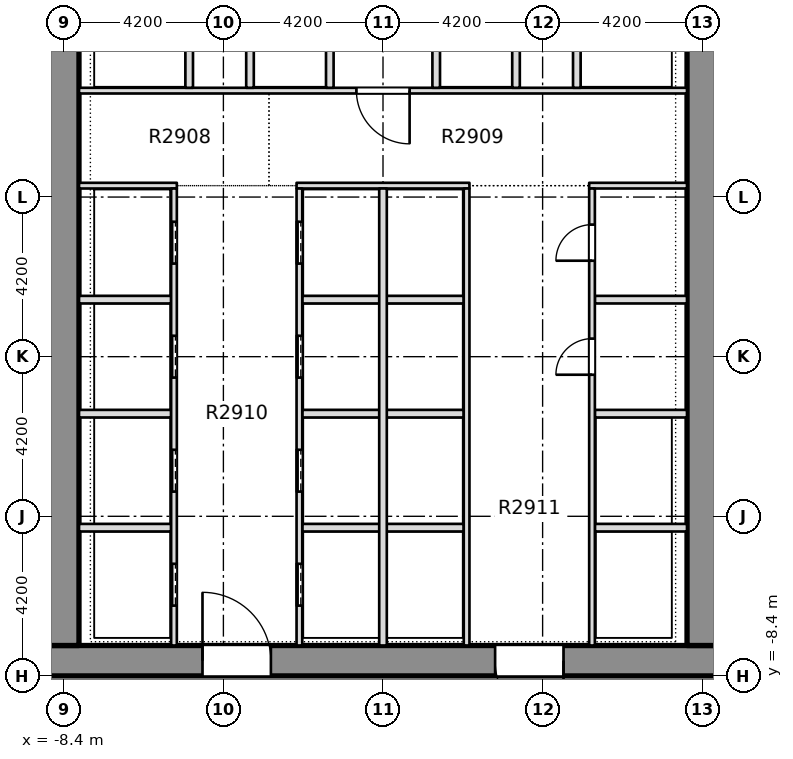
"""IFC4 building model, lengths in metres.
Left out: names, types, materials, properties, quantities, classifications, styles, units other than length and angle.
Written with IfcOpenShell. Run it as: python <this file> out.ifc"""

import sys

from ifc_helpers import new_model, si_unit, direction, frame, frame_2d, origin, place, context, subcontext, project, spatial, rectangle, extrude, element, fill, save


model = new_model("IFC4")
c1 = context("Model", 3, precision=1e-05, world=origin(), true_north=direction((0.0, 1.0)))
c2 = subcontext(c1, "Body", "Model", "MODEL_VIEW")
j1 = project(units=[si_unit("LENGTHUNIT", "METRE"), si_unit("PLANEANGLEUNIT", "RADIAN")], contexts=[c1])
p1 = place(None, origin())
s1 = spatial("IfcSite", under=j1, at=p1, CompositionType="ELEMENT")
p2 = place(p1, origin())
s2 = spatial("IfcBuilding", under=s1, at=p2, CompositionType="ELEMENT")
p3 = place(p2, frame((0.0, 0.0, 114.9)))
s3 = spatial("IfcBuildingStorey", under=s2, at=p3, CompositionType="ELEMENT", Elevation=114.9)
p4 = place(p3, frame((-11.8, -8.0, -0.32), z_axis=(0.0, 0.0, 1.0), x_axis=(1.0, 0.0, 0.0)))
e1 = element("IfcWall", 1, at=p4, inside=s3, PredefinedType="SHEAR", context=c2, shape_type="SweptSolid", body=[
    extrude(rectangle(XDim=23.6, YDim=0.8, at=frame_2d((11.8, 0.0))), origin(), (0.0, 0.0, 1.0), 3.45),
])
p5 = place(p4, frame((7.05, 0.0, 0.32)))
e2 = element("IfcOpeningElement", 2, at=p5, cuts=e1, PredefinedType="OPENING", context=c2, shape_type="SweptSolid", body=[
    extrude(rectangle(XDim=1.8, YDim=2.1, at=frame_2d((0.9, 1.05))), frame((0.0, 0.41, 0.0), z_axis=(0.0, -1.0, 0.0), x_axis=(1.0, 0.0, 0.0)), (0.0, 0.0, 1.0), 0.82),
])
p6 = place(p4, frame((14.75, 0.0, 0.32)))
e3 = element("IfcOpeningElement", 3, at=p6, cuts=e1, PredefinedType="OPENING", context=c2, shape_type="SweptSolid", body=[
    extrude(rectangle(XDim=1.8, YDim=2.1, at=frame_2d((0.9, 1.05))), frame((0.0, 0.41, 0.0), z_axis=(0.0, -1.0, 0.0), x_axis=(1.0, 0.0, 0.0)), (0.0, 0.0, 1.0), 0.82),
])
p7 = place(p3, frame((-8.4, -7.6, -0.32), z_axis=(0.0, 0.0, 1.0), x_axis=(0.0, 1.0, 0.0)))
e4 = element("IfcWall", 4, at=p7, inside=s3, PredefinedType="SHEAR", context=c2, shape_type="SweptSolid", body=[
    extrude(rectangle(XDim=28.55, YDim=0.8, at=frame_2d((14.275, 0.0))), origin(), (0.0, 0.0, 1.0), 3.45),
])
p8 = place(p7, frame((18.5, 0.0, 0.32)))
e5 = element("IfcOpeningElement", 5, at=p8, cuts=e4, PredefinedType="OPENING", context=c2, shape_type="SweptSolid", body=[
    extrude(rectangle(XDim=1.2, YDim=2.1, at=frame_2d((0.6, 1.05))), frame((0.0, 0.41, 0.0), z_axis=(0.0, -1.0, 0.0), x_axis=(1.0, 0.0, 0.0)), (0.0, 0.0, 1.0), 0.82),
])
p9 = place(p3, frame((8.4, -7.6, -0.32), z_axis=(0.0, 0.0, 1.0), x_axis=(0.0, 1.0, 0.0)))
e6 = element("IfcWall", 6, at=p9, inside=s3, PredefinedType="SHEAR", context=c2, shape_type="SweptSolid", body=[
    extrude(rectangle(XDim=28.55, YDim=0.8, at=frame_2d((14.275, 0.0))), origin(), (0.0, 0.0, 1.0), 3.45),
])
p10 = place(p9, frame((18.5, 0.0, 0.32)))
e7 = element("IfcOpeningElement", 7, at=p10, cuts=e6, PredefinedType="OPENING", context=c2, shape_type="SweptSolid", body=[
    extrude(rectangle(XDim=1.2, YDim=2.1, at=frame_2d((0.6, 1.05))), frame((0.0, 0.41, 0.0), z_axis=(0.0, -1.0, 0.0), x_axis=(1.0, 0.0, 0.0)), (0.0, 0.0, 1.0), 0.82),
])
p11 = place(p3, frame((-7.999, -4.5, 0.0), z_axis=(0.0, 0.0, 1.0), x_axis=(1.0, 0.0, 0.0)))
e8 = element("IfcWall", 8, at=p11, inside=s3, PredefinedType="PARTITIONING", context=c2, shape_type="SweptSolid", body=[
    extrude(rectangle(XDim=2.424, YDim=0.2, at=frame_2d((1.212, 0.0))), origin(), (0.0, 0.0, 1.0), 3.13),
])
p12 = place(p3, frame((-2.125, -4.5, 0.0), z_axis=(0.0, 0.0, 1.0), x_axis=(1.0, 0.0, 0.0)))
e9 = element("IfcWall", 9, at=p12, inside=s3, PredefinedType="PARTITIONING", context=c2, shape_type="SweptSolid", body=[
    extrude(rectangle(XDim=4.25, YDim=0.2, at=frame_2d((2.125, 0.0))), origin(), (0.0, 0.0, 1.0), 3.13),
])
for number, where, z_axis, x_axis in (
    (10, (5.575, -4.5, 0.0), (0.0, 0.0, 1.0), (1.0, 0.0, 0.0)),
    (11, (-7.999, -1.5, 0.0), (0.0, 0.0, 1.0), (1.0, 0.0, 0.0)),
):
    element("IfcWall", number, at=place(p3, frame(where, z_axis=z_axis, x_axis=x_axis)), inside=s3, PredefinedType="PARTITIONING", context=c2, shape_type="SweptSolid", body=[
        extrude(rectangle(XDim=2.424, YDim=0.2, at=frame_2d((1.212, 0.0))), origin(), (0.0, 0.0, 1.0), 3.13),
    ])
p13 = place(p3, frame((-2.125, -1.5, 0.0), z_axis=(0.0, 0.0, 1.0), x_axis=(1.0, 0.0, 0.0)))
e12 = element("IfcWall", 12, at=p13, inside=s3, PredefinedType="PARTITIONING", context=c2, shape_type="SweptSolid", body=[
    extrude(rectangle(XDim=4.25, YDim=0.2, at=frame_2d((2.125, 0.0))), origin(), (0.0, 0.0, 1.0), 3.13),
])
for number, where, z_axis, x_axis in (
    (13, (5.575, -1.5, 0.0), (0.0, 0.0, 1.0), (1.0, 0.0, 0.0)),
    (14, (-7.999, 1.5, 0.0), (0.0, 0.0, 1.0), (1.0, 0.0, 0.0)),
):
    element("IfcWall", number, at=place(p3, frame(where, z_axis=z_axis, x_axis=x_axis)), inside=s3, PredefinedType="PARTITIONING", context=c2, shape_type="SweptSolid", body=[
        extrude(rectangle(XDim=2.424, YDim=0.2, at=frame_2d((1.212, 0.0))), origin(), (0.0, 0.0, 1.0), 3.13),
    ])
p14 = place(p3, frame((-2.125, 1.5, 0.0), z_axis=(0.0, 0.0, 1.0), x_axis=(1.0, 0.0, 0.0)))
e15 = element("IfcWall", 15, at=p14, inside=s3, PredefinedType="PARTITIONING", context=c2, shape_type="SweptSolid", body=[
    extrude(rectangle(XDim=4.25, YDim=0.2, at=frame_2d((2.125, 0.0))), origin(), (0.0, 0.0, 1.0), 3.13),
])
p15 = place(p3, frame((5.575, 1.5, 0.0), z_axis=(0.0, 0.0, 1.0), x_axis=(1.0, 0.0, 0.0)))
e16 = element("IfcWall", 16, at=p15, inside=s3, PredefinedType="PARTITIONING", context=c2, shape_type="SweptSolid", body=[
    extrude(rectangle(XDim=2.424, YDim=0.2, at=frame_2d((1.212, 0.0))), origin(), (0.0, 0.0, 1.0), 3.13),
])
p16 = place(p3, frame((-7.999, 4.5, 0.0), z_axis=(0.0, 0.0, 1.0), x_axis=(1.0, 0.0, 0.0)))
e17 = element("IfcWall", 17, at=p16, inside=s3, PredefinedType="PARTITIONING", context=c2, shape_type="SweptSolid", body=[
    extrude(rectangle(XDim=2.574, YDim=0.15, at=frame_2d((1.287, 0.0))), origin(), (0.0, 0.0, 1.0), 3.13),
])
p17 = place(p3, frame((-2.275, 4.5, 0.0), z_axis=(0.0, 0.0, 1.0), x_axis=(1.0, 0.0, 0.0)))
e18 = element("IfcWall", 18, at=p17, inside=s3, PredefinedType="PARTITIONING", context=c2, shape_type="SweptSolid", body=[
    extrude(rectangle(XDim=4.55, YDim=0.15, at=frame_2d((2.275, 0.0))), origin(), (0.0, 0.0, 1.0), 3.13),
])
p18 = place(p3, frame((5.425, 4.5, 0.0), z_axis=(0.0, 0.0, 1.0), x_axis=(1.0, 0.0, 0.0)))
e19 = element("IfcWall", 19, at=p18, inside=s3, PredefinedType="PARTITIONING", context=c2, shape_type="SweptSolid", body=[
    extrude(rectangle(XDim=2.574, YDim=0.15, at=frame_2d((1.287, 0.0))), origin(), (0.0, 0.0, 1.0), 3.13),
])
p19 = place(p3, frame((-7.999, 7.0, 0.0), z_axis=(0.0, 0.0, 1.0), x_axis=(1.0, 0.0, 0.0)))
e20 = element("IfcWall", 20, at=p19, inside=s3, PredefinedType="PARTITIONING", context=c2, shape_type="SweptSolid", body=[
    extrude(rectangle(XDim=15.998, YDim=0.15, at=frame_2d((7.999, 0.0))), origin(), (0.0, 0.0, 1.0), 3.13),
])
p20 = place(p19, frame((7.299, 0.0, 0.0)))
e21 = element("IfcOpeningElement", 21, at=p20, cuts=e20, PredefinedType="OPENING", context=c2, shape_type="SweptSolid", body=[
    extrude(rectangle(XDim=1.4, YDim=2.1, at=frame_2d((0.7, 1.05))), frame((0.0, 0.085, 0.0), z_axis=(0.0, -1.0, 0.0), x_axis=(1.0, 0.0, 0.0)), (0.0, 0.0, 1.0), 0.17),
])
p21 = place(p3, frame((-5.5, -7.599, 0.0), z_axis=(0.0, 0.0, 1.0), x_axis=(0.0, 1.0, 0.0)))
e22 = element("IfcWall", 22, at=p21, inside=s3, PredefinedType="PARTITIONING", context=c2, shape_type="SweptSolid", body=[
    extrude(rectangle(XDim=12.024, YDim=0.15, at=frame_2d((6.012, 0.0))), origin(), (0.0, 0.0, 1.0), 3.13),
])
p22 = place(p21, frame((1.049, 0.0, 0.0)))
e23 = element("IfcOpeningElement", 23, at=p22, cuts=e22, PredefinedType="OPENING", context=c2, shape_type="SweptSolid", body=[
    extrude(rectangle(XDim=1.1, YDim=2.1, at=frame_2d((0.55, 1.05))), frame((0.0, 0.085, 0.0), z_axis=(0.0, -1.0, 0.0), x_axis=(1.0, 0.0, 0.0)), (0.0, 0.0, 1.0), 0.17),
])
p23 = place(p21, frame((4.049, 0.0, 0.0)))
e24 = element("IfcOpeningElement", 24, at=p23, cuts=e22, PredefinedType="OPENING", context=c2, shape_type="SweptSolid", body=[
    extrude(rectangle(XDim=1.1, YDim=2.1, at=frame_2d((0.55, 1.05))), frame((0.0, 0.085, 0.0), z_axis=(0.0, -1.0, 0.0), x_axis=(1.0, 0.0, 0.0)), (0.0, 0.0, 1.0), 0.17),
])
p24 = place(p21, frame((7.049, 0.0, 0.0)))
e25 = element("IfcOpeningElement", 25, at=p24, cuts=e22, PredefinedType="OPENING", context=c2, shape_type="SweptSolid", body=[
    extrude(rectangle(XDim=1.1, YDim=2.1, at=frame_2d((0.55, 1.05))), frame((0.0, 0.085, 0.0), z_axis=(0.0, -1.0, 0.0), x_axis=(1.0, 0.0, 0.0)), (0.0, 0.0, 1.0), 0.17),
])
p25 = place(p21, frame((10.049, 0.0, 0.0)))
e26 = element("IfcOpeningElement", 26, at=p25, cuts=e22, PredefinedType="OPENING", context=c2, shape_type="SweptSolid", body=[
    extrude(rectangle(XDim=1.1, YDim=2.1, at=frame_2d((0.55, 1.05))), frame((0.0, 0.085, 0.0), z_axis=(0.0, -1.0, 0.0), x_axis=(1.0, 0.0, 0.0)), (0.0, 0.0, 1.0), 0.17),
])
p26 = place(p3, frame((-5.1, 7.075, 0.0), z_axis=(0.0, 0.0, 1.0), x_axis=(0.0, 1.0, 0.0)))
e27 = element("IfcWall", 27, at=p26, inside=s3, PredefinedType="PARTITIONING", context=c2, shape_type="SweptSolid", body=[
    extrude(rectangle(XDim=2.725, YDim=0.2, at=frame_2d((1.363, 0.0))), origin(), (0.0, 0.0, 1.0), 3.13),
])
p27 = place(p3, frame((-3.5, 7.075, 0.0), z_axis=(0.0, 0.0, 1.0), x_axis=(0.0, 1.0, 0.0)))
e28 = element("IfcWall", 28, at=p27, inside=s3, PredefinedType="PARTITIONING", context=c2, shape_type="SweptSolid", body=[
    extrude(rectangle(XDim=2.85, YDim=0.2, at=frame_2d((1.425, 0.0))), origin(), (0.0, 0.0, 1.0), 3.13),
])
p28 = place(p3, frame((-2.2, -7.599, 0.0), z_axis=(0.0, 0.0, 1.0), x_axis=(0.0, 1.0, 0.0)))
e29 = element("IfcWall", 29, at=p28, inside=s3, PredefinedType="PARTITIONING", context=c2, shape_type="SweptSolid", body=[
    extrude(rectangle(XDim=12.024, YDim=0.15, at=frame_2d((6.012, 0.0))), origin(), (0.0, 0.0, 1.0), 3.13),
])
p29 = place(p28, frame((1.049, 0.0, 0.0)))
e30 = element("IfcOpeningElement", 30, at=p29, cuts=e29, PredefinedType="OPENING", context=c2, shape_type="SweptSolid", body=[
    extrude(rectangle(XDim=1.1, YDim=2.1, at=frame_2d((0.55, 1.05))), frame((0.0, 0.085, 0.0), z_axis=(0.0, -1.0, 0.0), x_axis=(1.0, 0.0, 0.0)), (0.0, 0.0, 1.0), 0.17),
])
p30 = place(p28, frame((4.049, 0.0, 0.0)))
e31 = element("IfcOpeningElement", 31, at=p30, cuts=e29, PredefinedType="OPENING", context=c2, shape_type="SweptSolid", body=[
    extrude(rectangle(XDim=1.1, YDim=2.1, at=frame_2d((0.55, 1.05))), frame((0.0, 0.085, 0.0), z_axis=(0.0, -1.0, 0.0), x_axis=(1.0, 0.0, 0.0)), (0.0, 0.0, 1.0), 0.17),
])
p31 = place(p28, frame((7.049, 0.0, 0.0)))
e32 = element("IfcOpeningElement", 32, at=p31, cuts=e29, PredefinedType="OPENING", context=c2, shape_type="SweptSolid", body=[
    extrude(rectangle(XDim=1.1, YDim=2.1, at=frame_2d((0.55, 1.05))), frame((0.0, 0.085, 0.0), z_axis=(0.0, -1.0, 0.0), x_axis=(1.0, 0.0, 0.0)), (0.0, 0.0, 1.0), 0.17),
])
p32 = place(p28, frame((10.049, 0.0, 0.0)))
e33 = element("IfcOpeningElement", 33, at=p32, cuts=e29, PredefinedType="OPENING", context=c2, shape_type="SweptSolid", body=[
    extrude(rectangle(XDim=1.1, YDim=2.1, at=frame_2d((0.55, 1.05))), frame((0.0, 0.085, 0.0), z_axis=(0.0, -1.0, 0.0), x_axis=(1.0, 0.0, 0.0)), (0.0, 0.0, 1.0), 0.17),
])
p33 = place(p3, frame((-1.4, 7.075, 0.0), z_axis=(0.0, 0.0, 1.0), x_axis=(0.0, 1.0, 0.0)))
e34 = element("IfcWall", 34, at=p33, inside=s3, PredefinedType="PARTITIONING", context=c2, shape_type="SweptSolid", body=[
    extrude(rectangle(XDim=2.85, YDim=0.2, at=frame_2d((1.425, 0.0))), origin(), (0.0, 0.0, 1.0), 3.13),
])
p34 = place(p3, frame((0.0, -7.599, 0.0), z_axis=(0.0, 0.0, 1.0), x_axis=(0.0, 1.0, 0.0)))
e35 = element("IfcWall", 35, at=p34, inside=s3, PredefinedType="PARTITIONING", context=c2, shape_type="SweptSolid", body=[
    extrude(rectangle(XDim=12.024, YDim=0.2, at=frame_2d((6.012, 0.0))), origin(), (0.0, 0.0, 1.0), 3.13),
])
p35 = place(p3, frame((1.4, 7.075, 0.0), z_axis=(0.0, 0.0, 1.0), x_axis=(0.0, 1.0, 0.0)))
e36 = element("IfcWall", 36, at=p35, inside=s3, PredefinedType="PARTITIONING", context=c2, shape_type="SweptSolid", body=[
    extrude(rectangle(XDim=2.85, YDim=0.2, at=frame_2d((1.425, 0.0))), origin(), (0.0, 0.0, 1.0), 3.13),
])
p36 = place(p3, frame((2.2, -7.599, 0.0), z_axis=(0.0, 0.0, 1.0), x_axis=(0.0, 1.0, 0.0)))
e37 = element("IfcWall", 37, at=p36, inside=s3, PredefinedType="PARTITIONING", context=c2, shape_type="SweptSolid", body=[
    extrude(rectangle(XDim=12.024, YDim=0.15, at=frame_2d((6.012, 0.0))), origin(), (0.0, 0.0, 1.0), 3.13),
])
p37 = place(p3, frame((3.5, 7.075, 0.0), z_axis=(0.0, 0.0, 1.0), x_axis=(0.0, 1.0, 0.0)))
e38 = element("IfcWall", 38, at=p37, inside=s3, PredefinedType="PARTITIONING", context=c2, shape_type="SweptSolid", body=[
    extrude(rectangle(XDim=2.85, YDim=0.2, at=frame_2d((1.425, 0.0))), origin(), (0.0, 0.0, 1.0), 3.13),
])
p38 = place(p3, frame((5.1, 7.075, 0.0), z_axis=(0.0, 0.0, 1.0), x_axis=(0.0, 1.0, 0.0)))
e39 = element("IfcWall", 39, at=p38, inside=s3, PredefinedType="PARTITIONING", context=c2, shape_type="SweptSolid", body=[
    extrude(rectangle(XDim=2.725, YDim=0.2, at=frame_2d((1.363, 0.0))), origin(), (0.0, 0.0, 1.0), 3.13),
])
p39 = place(p3, frame((5.5, -7.599, 0.0), z_axis=(0.0, 0.0, 1.0), x_axis=(0.0, 1.0, 0.0)))
e40 = element("IfcWall", 40, at=p39, inside=s3, PredefinedType="PARTITIONING", context=c2, shape_type="SweptSolid", body=[
    extrude(rectangle(XDim=12.024, YDim=0.15, at=frame_2d((6.012, 0.0))), origin(), (0.0, 0.0, 1.0), 3.13),
])
p40 = place(p39, frame((7.124, 0.0, 0.0)))
e41 = element("IfcOpeningElement", 41, at=p40, cuts=e40, PredefinedType="OPENING", context=c2, shape_type="SweptSolid", body=[
    extrude(rectangle(XDim=0.95, YDim=2.1, at=frame_2d((0.475, 1.05))), frame((0.0, 0.085, 0.0), z_axis=(0.0, -1.0, 0.0), x_axis=(1.0, 0.0, 0.0)), (0.0, 0.0, 1.0), 0.17),
])
p41 = place(p39, frame((10.124, 0.0, 0.0)))
e42 = element("IfcOpeningElement", 42, at=p41, cuts=e40, PredefinedType="OPENING", context=c2, shape_type="SweptSolid", body=[
    extrude(rectangle(XDim=0.95, YDim=2.1, at=frame_2d((0.475, 1.05))), frame((0.0, 0.085, 0.0), z_axis=(0.0, -1.0, 0.0), x_axis=(1.0, 0.0, 0.0)), (0.0, 0.0, 1.0), 0.17),
])
p42 = place(p22, origin())
e43 = element("IfcDoor", 43, at=p42, inside=s3, OperationType="SLIDING_TO_LEFT", PredefinedType="DOOR", context=c2, shape_type="SweptSolid", body=[
    extrude(rectangle(XDim=1.1, YDim=2.1, at=frame_2d((0.55, 1.05))), frame((0.0, 0.025, 0.0), z_axis=(0.0, -1.0, 0.0), x_axis=(1.0, 0.0, 0.0)), (0.0, 0.0, 1.0), 0.05),
])
fill(e23, e43)
p43 = place(p23, origin())
e44 = element("IfcDoor", 44, at=p43, inside=s3, OperationType="SLIDING_TO_LEFT", PredefinedType="DOOR", context=c2, shape_type="SweptSolid", body=[
    extrude(rectangle(XDim=1.1, YDim=2.1, at=frame_2d((0.55, 1.05))), frame((0.0, 0.025, 0.0), z_axis=(0.0, -1.0, 0.0), x_axis=(1.0, 0.0, 0.0)), (0.0, 0.0, 1.0), 0.05),
])
fill(e24, e44)
p44 = place(p24, origin())
e45 = element("IfcDoor", 45, at=p44, inside=s3, OperationType="SLIDING_TO_LEFT", PredefinedType="DOOR", context=c2, shape_type="SweptSolid", body=[
    extrude(rectangle(XDim=1.1, YDim=2.1, at=frame_2d((0.55, 1.05))), frame((0.0, 0.025, 0.0), z_axis=(0.0, -1.0, 0.0), x_axis=(1.0, 0.0, 0.0)), (0.0, 0.0, 1.0), 0.05),
])
fill(e25, e45)
p45 = place(p25, origin())
e46 = element("IfcDoor", 46, at=p45, inside=s3, OperationType="SLIDING_TO_LEFT", PredefinedType="DOOR", context=c2, shape_type="SweptSolid", body=[
    extrude(rectangle(XDim=1.1, YDim=2.1, at=frame_2d((0.55, 1.05))), frame((0.0, 0.025, 0.0), z_axis=(0.0, -1.0, 0.0), x_axis=(1.0, 0.0, 0.0)), (0.0, 0.0, 1.0), 0.05),
])
fill(e26, e46)
p46 = place(p29, origin())
e47 = element("IfcDoor", 47, at=p46, inside=s3, OperationType="SLIDING_TO_LEFT", PredefinedType="DOOR", context=c2, shape_type="SweptSolid", body=[
    extrude(rectangle(XDim=1.1, YDim=2.1, at=frame_2d((0.55, 1.05))), frame((0.0, 0.025, 0.0), z_axis=(0.0, -1.0, 0.0), x_axis=(1.0, 0.0, 0.0)), (0.0, 0.0, 1.0), 0.05),
])
fill(e30, e47)
p47 = place(p30, origin())
e48 = element("IfcDoor", 48, at=p47, inside=s3, OperationType="SLIDING_TO_LEFT", PredefinedType="DOOR", context=c2, shape_type="SweptSolid", body=[
    extrude(rectangle(XDim=1.1, YDim=2.1, at=frame_2d((0.55, 1.05))), frame((0.0, 0.025, 0.0), z_axis=(0.0, -1.0, 0.0), x_axis=(1.0, 0.0, 0.0)), (0.0, 0.0, 1.0), 0.05),
])
fill(e31, e48)
p48 = place(p31, origin())
e49 = element("IfcDoor", 49, at=p48, inside=s3, OperationType="SLIDING_TO_LEFT", PredefinedType="DOOR", context=c2, shape_type="SweptSolid", body=[
    extrude(rectangle(XDim=1.1, YDim=2.1, at=frame_2d((0.55, 1.05))), frame((0.0, 0.025, 0.0), z_axis=(0.0, -1.0, 0.0), x_axis=(1.0, 0.0, 0.0)), (0.0, 0.0, 1.0), 0.05),
])
fill(e32, e49)
p49 = place(p32, origin())
e50 = element("IfcDoor", 50, at=p49, inside=s3, OperationType="SLIDING_TO_LEFT", PredefinedType="DOOR", context=c2, shape_type="SweptSolid", body=[
    extrude(rectangle(XDim=1.1, YDim=2.1, at=frame_2d((0.55, 1.05))), frame((0.0, 0.025, 0.0), z_axis=(0.0, -1.0, 0.0), x_axis=(1.0, 0.0, 0.0)), (0.0, 0.0, 1.0), 0.05),
])
fill(e33, e50)
p50 = place(p40, origin())
e51 = element("IfcDoor", 51, at=p50, inside=s3, OperationType="SINGLE_SWING_RIGHT", PredefinedType="DOOR", context=c2, shape_type="SweptSolid", body=[
    extrude(rectangle(XDim=0.95, YDim=2.1, at=frame_2d((0.475, 1.05))), frame((0.0, 0.025, 0.0), z_axis=(0.0, -1.0, 0.0), x_axis=(1.0, 0.0, 0.0)), (0.0, 0.0, 1.0), 0.05),
])
fill(e41, e51)
p51 = place(p41, origin())
e52 = element("IfcDoor", 52, at=p51, inside=s3, OperationType="SINGLE_SWING_RIGHT", PredefinedType="DOOR", context=c2, shape_type="SweptSolid", body=[
    extrude(rectangle(XDim=0.95, YDim=2.1, at=frame_2d((0.475, 1.05))), frame((0.0, 0.025, 0.0), z_axis=(0.0, -1.0, 0.0), x_axis=(1.0, 0.0, 0.0)), (0.0, 0.0, 1.0), 0.05),
])
fill(e42, e52)
p52 = place(p20, origin())
e53 = element("IfcDoor", 53, at=p52, inside=s3, OperationType="SINGLE_SWING_RIGHT", PredefinedType="DOOR", context=c2, shape_type="SweptSolid", body=[
    extrude(rectangle(XDim=1.4, YDim=2.1, at=frame_2d((0.7, 1.05))), frame((0.0, 0.025, 0.0), z_axis=(0.0, -1.0, 0.0), x_axis=(1.0, 0.0, 0.0)), (0.0, 0.0, 1.0), 0.05),
])
fill(e21, e53)
p53 = place(p5, origin())
e54 = element("IfcDoor", 54, at=p53, inside=s3, OperationType="SINGLE_SWING_LEFT", PredefinedType="DOOR", context=c2, shape_type="SweptSolid", body=[
    extrude(rectangle(XDim=1.8, YDim=2.1, at=frame_2d((0.9, 1.05))), frame((0.0, 0.025, 0.0), z_axis=(0.0, -1.0, 0.0), x_axis=(1.0, 0.0, 0.0)), (0.0, 0.0, 1.0), 0.05),
])
fill(e2, e54)
p54 = place(p6, origin())
e55 = element("IfcDoor", 55, at=p54, inside=s3, OperationType="SINGLE_SWING_LEFT", PredefinedType="DOOR", context=c2, shape_type="SweptSolid", body=[
    extrude(rectangle(XDim=1.8, YDim=2.1, at=frame_2d((0.9, 1.05))), frame((0.0, 0.025, 0.0), z_axis=(0.0, -1.0, 0.0), x_axis=(1.0, 0.0, 0.0)), (0.0, 0.0, 1.0), 0.05),
])
fill(e3, e55)
save(model, sys.argv[1])
